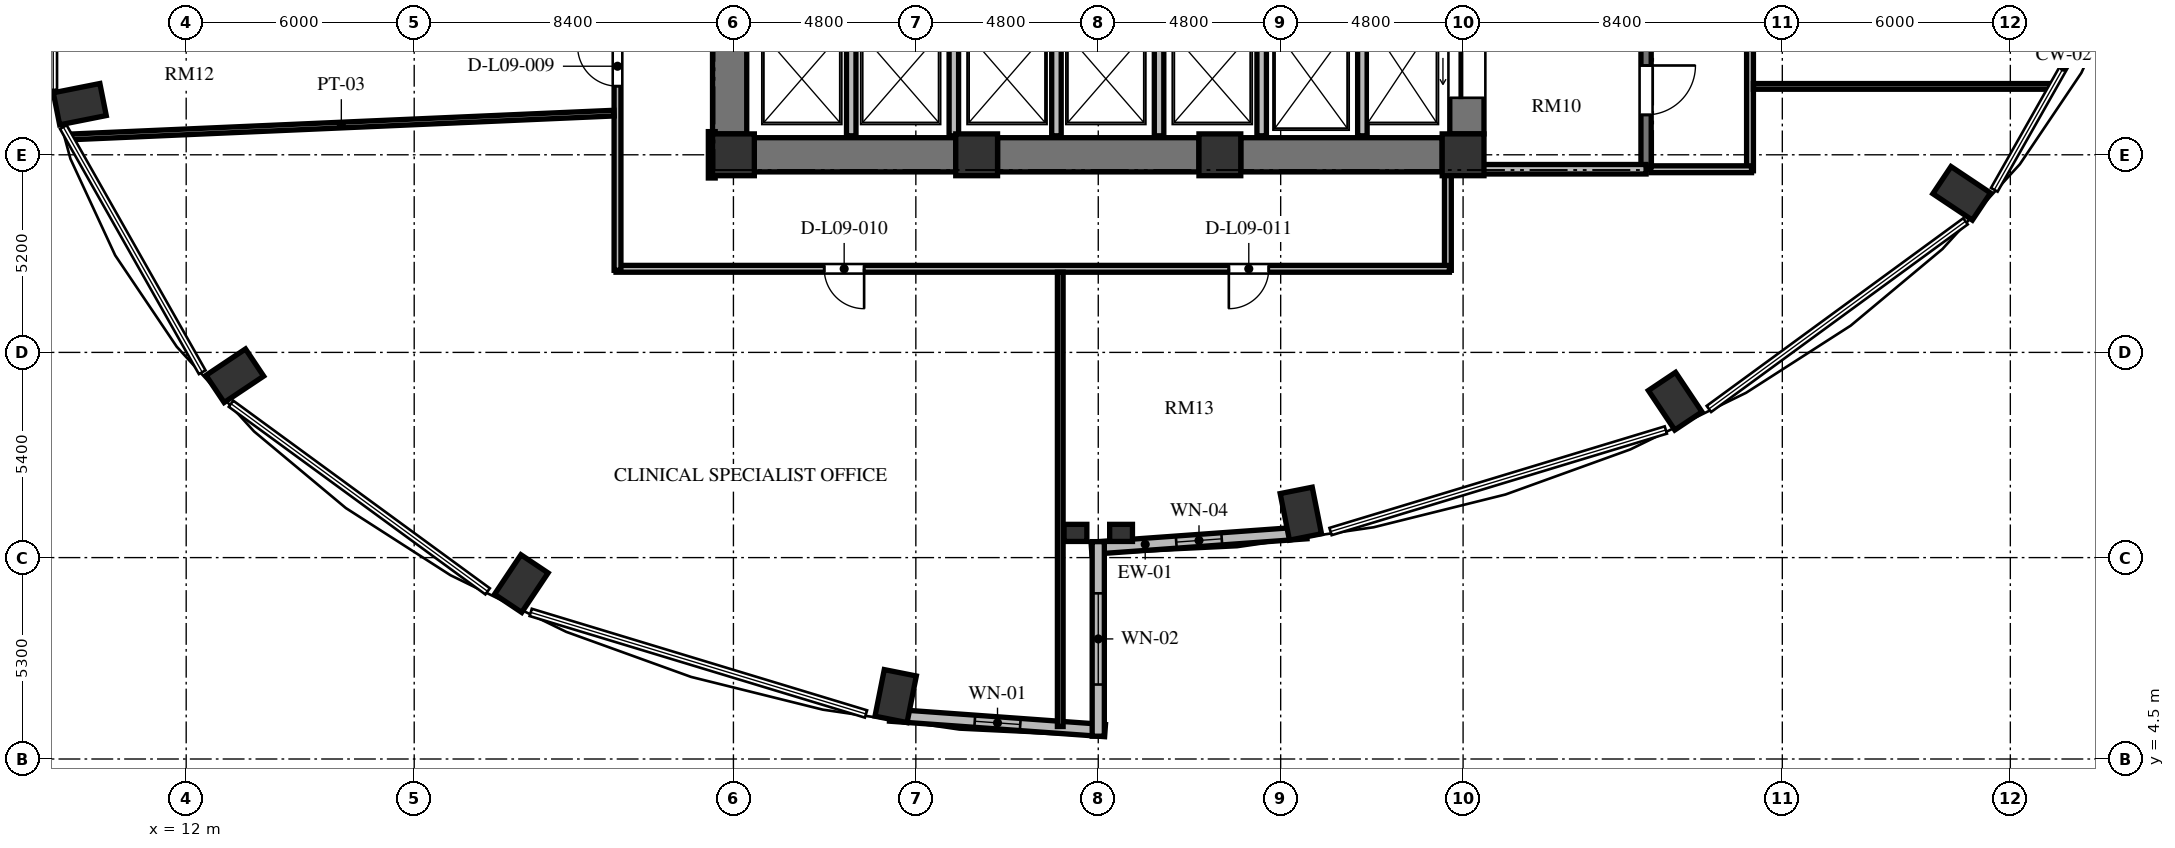
"""IFC4 building model, lengths in metres.
Left out: names, types, materials, properties, quantities, classifications, styles, units other than length and angle.
Written with IfcOpenShell. Run it as: python <this file> out.ifc"""

import sys

from ifc_helpers import new_model, si_unit, direction, frame, frame_2d, origin, origin_2d, place, context, subcontext, project, spatial, rectangle, extrude, element, fill, save


model = new_model("IFC4")
c1 = context("Model", 3, precision=1e-05, world=origin(), true_north=direction((0.0, 1.0)))
c2 = subcontext(c1, "Body", "Model", "MODEL_VIEW")
j1 = project(units=[si_unit("LENGTHUNIT", "METRE"), si_unit("PLANEANGLEUNIT", "RADIAN")], contexts=[c1])
p1 = place(None, origin())
s1 = spatial("IfcSite", under=j1, at=p1, CompositionType="ELEMENT")
p2 = place(p1, origin())
s2 = spatial("IfcBuilding", under=s1, at=p2, CompositionType="ELEMENT")
p3 = place(p2, frame((0.0, 0.0, 39.792)))
s3 = spatial("IfcBuildingStorey", under=s2, at=p3, CompositionType="ELEMENT", Elevation=39.792)
for number, where, z_axis, x_axis in (
    (1, (41.331, 10.956, 0.0), (0.0, 0.0, 1.0), (0.195, -0.981, 0.0)),
    (2, (51.181, 13.916, 0.0), (0.0, 0.0, 1.0), (0.556, -0.831, 0.0)),
    (3, (58.72, 19.386, 0.0), (0.0, 0.0, 1.0), (0.831, -0.556, 0.0)),
    (4, (9.2, 21.732, 0.0), (0.0, 0.0, 1.0), (-0.981, -0.195, 0.0)),
    (5, (13.28, 14.586, 0.0), (0.0, 0.0, 1.0), (-0.831, -0.556, 0.0)),
    (6, (20.819, 9.116, 0.0), (0.0, 0.0, 1.0), (-0.556, -0.831, 0.0)),
    (7, (30.669, 6.156, 0.0), (0.0, 0.0, 1.0), (-0.195, -0.981, 0.0)),
):
    element("IfcColumn", number, at=place(p3, frame(where, z_axis=z_axis, x_axis=x_axis)), inside=s3, PredefinedType="COLUMN", context=c2, shape_type="SweptSolid", body=[
        extrude(rectangle(XDim=1.25, YDim=0.86, at=origin_2d()), origin(), (0.0, 0.0, 1.0), 3.648),
    ])
for number, where, z_axis, x_axis in (
    (8, (26.4, 20.4, 0.0), (0.0, 0.0, 1.0), (1.0, 0.0, 0.0)),
    (9, (32.8, 20.4, 0.0), (0.0, 0.0, 1.0), (1.0, 0.0, 0.0)),
    (10, (39.2, 20.4, 0.0), (0.0, 0.0, 1.0), (1.0, 0.0, 0.0)),
    (11, (45.6, 20.4, 0.0), (0.0, 0.0, 1.0), (1.0, 0.0, 0.0)),
):
    element("IfcColumn", number, at=place(p3, frame(where, z_axis=z_axis, x_axis=x_axis)), inside=s3, PredefinedType="COLUMN", context=c2, shape_type="SweptSolid", body=[
        extrude(rectangle(XDim=1.1, YDim=1.1, at=origin_2d()), origin(), (0.0, 0.0, 1.0), 3.648),
    ])
for number, where, z_axis, x_axis in (
    (12, (35.4, 10.45, 0.0), (0.0, 0.0, 1.0), (1.0, 0.0, 0.0)),
    (13, (36.6, 10.45, 0.0), (0.0, 0.0, 1.0), (1.0, 0.0, 0.0)),
):
    element("IfcColumn", number, at=place(p3, frame(where, z_axis=z_axis, x_axis=x_axis)), inside=s3, PredefinedType="PILASTER", context=c2, shape_type="SweptSolid", body=[
        extrude(rectangle(XDim=0.6, YDim=0.45, at=origin_2d()), origin(), (0.0, 0.0, 1.0), 3.648),
    ])
p4 = place(p3, frame((26.3, 20.95, 0.0), z_axis=(0.0, 0.0, 1.0), x_axis=(0.0, 1.0, 0.0)))
e14 = element("IfcWall", 14, at=p4, inside=s3, PredefinedType="SHEAR", context=c2, shape_type="SweptSolid", body=[
    extrude(rectangle(XDim=14.1, YDim=0.9, at=frame_2d((7.05, 0.0))), origin(), (0.0, 0.0, 1.0), 3.648),
])
p5 = place(p4, frame((6.5, 0.0, 0.0)))
e15 = element("IfcOpeningElement", 15, at=p5, cuts=e14, PredefinedType="OPENING", context=c2, shape_type="SweptSolid", body=[
    extrude(rectangle(XDim=1.2, YDim=2.15, at=frame_2d((0.6, 1.075))), frame((0.0, 0.46, 0.0), z_axis=(0.0, -1.0, 0.0), x_axis=(1.0, 0.0, 0.0)), (0.0, 0.0, 1.0), 0.92),
])
p6 = place(p4, frame((9.6, 0.0, 0.0)))
e16 = element("IfcOpeningElement", 16, at=p6, cuts=e14, PredefinedType="OPENING", context=c2, shape_type="SweptSolid", body=[
    extrude(rectangle(XDim=1.3, YDim=2.2, at=frame_2d((0.65, 1.1))), frame((0.0, 0.46, 0.0), z_axis=(0.0, -1.0, 0.0), x_axis=(1.0, 0.0, 0.0)), (0.0, 0.0, 1.0), 0.92),
])
p7 = place(p4, frame((3.26, 0.0, 0.0)))
e17 = element("IfcOpeningElement", 17, at=p7, cuts=e14, PredefinedType="OPENING", context=c2, shape_type="SweptSolid", body=[
    extrude(rectangle(XDim=1.3, YDim=2.2, at=frame_2d((0.65, 1.1))), frame((0.0, 0.46, 0.0), z_axis=(0.0, -1.0, 0.0), x_axis=(1.0, 0.0, 0.0)), (0.0, 0.0, 1.0), 0.92),
])
p8 = place(p3, frame((45.7, 20.95, 0.0), z_axis=(0.0, 0.0, 1.0), x_axis=(0.0, 1.0, 0.0)))
e18 = element("IfcWall", 18, at=p8, inside=s3, PredefinedType="SHEAR", context=c2, shape_type="SweptSolid", body=[
    extrude(rectangle(XDim=14.1, YDim=0.9, at=frame_2d((7.05, 0.0))), origin(), (0.0, 0.0, 1.0), 3.648),
])
p9 = place(p8, frame((11.75, 0.0, 0.0)))
e19 = element("IfcOpeningElement", 19, at=p9, cuts=e18, PredefinedType="OPENING", context=c2, shape_type="SweptSolid", body=[
    extrude(rectangle(XDim=1.4, YDim=2.3, at=frame_2d((0.7, 1.15))), frame((0.0, 0.46, 0.0), z_axis=(0.0, -1.0, 0.0), x_axis=(1.0, 0.0, 0.0)), (0.0, 0.0, 1.0), 0.92),
])
p10 = place(p8, frame((0.95, 0.0, 0.0)))
e20 = element("IfcOpeningElement", 20, at=p10, cuts=e18, PredefinedType="OPENING", context=c2, shape_type="SweptSolid", body=[
    extrude(rectangle(XDim=1.4, YDim=2.3, at=frame_2d((0.7, 1.15))), frame((0.0, 0.46, 0.0), z_axis=(0.0, -1.0, 0.0), x_axis=(1.0, 0.0, 0.0)), (0.0, 0.0, 1.0), 0.92),
])
p11 = place(p3, frame((26.95, 20.4, 0.0), z_axis=(0.0, 0.0, 1.0), x_axis=(1.0, 0.0, 0.0)))
e21 = element("IfcWall", 21, at=p11, inside=s3, PredefinedType="SHEAR", context=c2, shape_type="SweptSolid", body=[
    extrude(rectangle(XDim=5.3, YDim=0.9, at=frame_2d((2.65, 0.0))), origin(), (0.0, 0.0, 1.0), 3.648),
])
p12 = place(p3, frame((33.35, 20.4, 0.0), z_axis=(0.0, 0.0, 1.0), x_axis=(1.0, 0.0, 0.0)))
e22 = element("IfcWall", 22, at=p12, inside=s3, PredefinedType="SHEAR", context=c2, shape_type="SweptSolid", body=[
    extrude(rectangle(XDim=5.3, YDim=0.9, at=frame_2d((2.65, 0.0))), origin(), (0.0, 0.0, 1.0), 3.648),
])
p13 = place(p3, frame((39.75, 20.4, 0.0), z_axis=(0.0, 0.0, 1.0), x_axis=(1.0, 0.0, 0.0)))
e23 = element("IfcWall", 23, at=p13, inside=s3, PredefinedType="SHEAR", context=c2, shape_type="SweptSolid", body=[
    extrude(rectangle(XDim=5.3, YDim=0.9, at=frame_2d((2.65, 0.0))), origin(), (0.0, 0.0, 1.0), 3.648),
])
p14 = place(p3, frame((35.821, 10.047, 0.0), z_axis=(0.0, 0.0, 1.0), x_axis=(0.997422321809, 0.071754525696, 0.0)))
e24 = element("IfcWall", 24, at=p14, inside=s3, PredefinedType="SOLIDWALL", context=c2, shape_type="SweptSolid", body=[
    extrude(rectangle(XDim=5.675, YDim=0.32, at=frame_2d((2.838, 0.0))), origin(), (0.0, 0.0, 1.0), 3.428),
])
p15 = place(p14, frame((2.238, 0.0, 0.85)))
e25 = element("IfcOpeningElement", 25, at=p15, cuts=e24, PredefinedType="OPENING", context=c2, shape_type="SweptSolid", body=[
    extrude(rectangle(XDim=1.2, YDim=1.8, at=frame_2d((0.6, 0.9))), frame((0.0, 0.17, 0.0), z_axis=(0.0, -1.0, 0.0), x_axis=(1.0, 0.0, 0.0)), (0.0, 0.0, 1.0), 0.34),
])
p16 = place(p3, frame((30.519, 5.654, 0.0), z_axis=(0.0, 0.0, 1.0), x_axis=(0.997421878774, -0.071760683825, 0.0)))
e26 = element("IfcWall", 26, at=p16, inside=s3, PredefinedType="SOLIDWALL", context=c2, shape_type="SweptSolid", body=[
    extrude(rectangle(XDim=5.675, YDim=0.32, at=frame_2d((2.837, 0.0))), origin(), (0.0, 0.0, 1.0), 3.428),
])
p17 = place(p16, frame((2.237, 0.0, 0.85)))
e27 = element("IfcOpeningElement", 27, at=p17, cuts=e26, PredefinedType="OPENING", context=c2, shape_type="SweptSolid", body=[
    extrude(rectangle(XDim=1.2, YDim=2.2, at=frame_2d((0.6, 1.1))), frame((0.0, 0.17, 0.0), z_axis=(0.0, -1.0, 0.0), x_axis=(1.0, 0.0, 0.0)), (0.0, 0.0, 1.0), 0.34),
])
p18 = place(p3, frame((36.0, 5.1, 0.0), z_axis=(0.0, 0.0, 1.0), x_axis=(0.0, 1.0, 0.0)))
e28 = element("IfcWall", 28, at=p18, inside=s3, PredefinedType="SOLIDWALL", context=c2, shape_type="SweptSolid", body=[
    extrude(rectangle(XDim=5.12, YDim=0.32, at=frame_2d((2.56, 0.0))), origin(), (0.0, 0.0, 1.0), 3.428),
])
p19 = place(p18, frame((1.36, 0.0, 0.84)))
e29 = element("IfcOpeningElement", 29, at=p19, cuts=e28, PredefinedType="OPENING", context=c2, shape_type="SweptSolid", body=[
    extrude(rectangle(XDim=2.4, YDim=2.04, at=frame_2d((1.2, 1.02))), frame((0.0, 0.17, 0.0), z_axis=(0.0, -1.0, 0.0), x_axis=(1.0, 0.0, 0.0)), (0.0, 0.0, 1.0), 0.34),
])
p20 = place(p3, frame((42.95, 20.9, 0.0), z_axis=(0.0, 0.0, 1.0), x_axis=(0.0, 1.0, 0.0)))
e30 = element("IfcWall", 30, at=p20, inside=s3, PredefinedType="SOLIDWALL", context=c2, shape_type="SweptSolid", body=[
    extrude(rectangle(XDim=3.2, YDim=0.25, at=frame_2d((1.6, 0.0))), origin(), (0.0, 0.0, 1.0), 3.428),
])
for number, where, z_axis, x_axis in (
    (31, (29.5, 20.9, 0.0), (0.0, 0.0, 1.0), (0.0, 1.0, 0.0)),
    (32, (32.2, 20.9, 0.0), (0.0, 0.0, 1.0), (0.0, 1.0, 0.0)),
    (33, (34.9, 20.9, 0.0), (0.0, 0.0, 1.0), (0.0, 1.0, 0.0)),
    (34, (37.6, 20.9, 0.0), (0.0, 0.0, 1.0), (0.0, 1.0, 0.0)),
    (35, (40.3, 20.9, 0.0), (0.0, 0.0, 1.0), (0.0, 1.0, 0.0)),
):
    element("IfcWall", number, at=place(p3, frame(where, z_axis=z_axis, x_axis=x_axis)), inside=s3, PredefinedType="SOLIDWALL", context=c2, shape_type="SweptSolid", body=[
        extrude(rectangle(XDim=2.8, YDim=0.25, at=frame_2d((1.4, 0.0))), origin(), (0.0, 0.0, 1.0), 3.428),
    ])
p21 = place(p3, frame((50.415, 35.845, 0.0), z_axis=(0.0, 0.0, 1.0), x_axis=(0.0, -1.0, 0.0)))
e36 = element("IfcWall", 36, at=p21, inside=s3, PredefinedType="SHEAR", context=c2, shape_type="SweptSolid", body=[
    extrude(rectangle(XDim=15.825, YDim=0.27, at=frame_2d((7.913, 0.0))), origin(), (0.0, 0.0, 1.0), 3.648),
])
p22 = place(p21, frame((4.445, 0.0, 0.0)))
e37 = element("IfcOpeningElement", 37, at=p22, cuts=e36, PredefinedType="OPENING", context=c2, shape_type="SweptSolid", body=[
    extrude(rectangle(XDim=1.2, YDim=2.15, at=frame_2d((0.6, 1.075))), frame((0.0, 0.145, 0.0), z_axis=(0.0, -1.0, 0.0), x_axis=(1.0, 0.0, 0.0)), (0.0, 0.0, 1.0), 0.29),
])
p23 = place(p21, frame((1.295, 0.0, 0.0)))
e38 = element("IfcOpeningElement", 38, at=p23, cuts=e36, PredefinedType="OPENING", context=c2, shape_type="SweptSolid", body=[
    extrude(rectangle(XDim=1.3, YDim=2.2, at=frame_2d((0.65, 1.1))), frame((0.0, 0.145, 0.0), z_axis=(0.0, -1.0, 0.0), x_axis=(1.0, 0.0, 0.0)), (0.0, 0.0, 1.0), 0.29),
])
p24 = place(p21, frame((13.095, 0.0, 0.0)))
e39 = element("IfcOpeningElement", 39, at=p24, cuts=e36, PredefinedType="OPENING", context=c2, shape_type="SweptSolid", body=[
    extrude(rectangle(XDim=1.3, YDim=2.2, at=frame_2d((0.65, 1.1))), frame((0.0, 0.145, 0.0), z_axis=(0.0, -1.0, 0.0), x_axis=(1.0, 0.0, 0.0)), (0.0, 0.0, 1.0), 0.29),
])
p25 = place(p3, frame((45.7, 20.02, 0.0), z_axis=(0.0, 0.0, 1.0), x_axis=(1.0, 0.0, 0.0)))
e40 = element("IfcWall", 40, at=p25, inside=s3, PredefinedType="SOLIDWALL", context=c2, shape_type="SweptSolid", body=[
    extrude(rectangle(XDim=4.715, YDim=0.25, at=frame_2d((2.357, 0.0))), origin(), (0.0, 0.0, 1.0), 2.813),
])
p26 = place(p3, frame((53.15, 26.64, 0.0), z_axis=(0.0, 0.0, 1.0), x_axis=(0.0, -1.0, 0.0)))
e41 = element("IfcWall", 41, at=p26, inside=s3, PredefinedType="PARTITIONING", context=c2, shape_type="SweptSolid", body=[
    extrude(rectangle(XDim=6.66, YDim=0.18, at=frame_2d((3.33, 0.0))), origin(), (0.0, 0.0, 1.0), 3.428),
])
p27 = place(p3, frame((53.19, 20.02, 0.0), z_axis=(0.0, 0.0, 1.0), x_axis=(-1.0, 0.0, 0.0)))
e42 = element("IfcWall", 42, at=p27, inside=s3, PredefinedType="PARTITIONING", context=c2, shape_type="SweptSolid", body=[
    extrude(rectangle(XDim=2.65, YDim=0.18, at=frame_2d((1.325, 0.0))), origin(), (0.0, 0.0, 1.0), 2.813),
])
p28 = place(p3, frame((25.83, 21.01, 0.0), z_axis=(0.0, 0.0, 1.0), x_axis=(0.0, -1.0, 0.0)))
e43 = element("IfcWall", 43, at=p28, inside=s3, PredefinedType="PARTITIONING", context=c2, shape_type="SweptSolid", body=[
    extrude(rectangle(XDim=1.22, YDim=0.18, at=frame_2d((0.61, 0.0))), origin(), (0.0, 0.0, 1.0), 3.428),
])
p29 = place(p3, frame((45.2, 19.91, 0.0), z_axis=(0.0, 0.0, 1.0), x_axis=(0.0, -1.0, 0.0)))
e44 = element("IfcWall", 44, at=p29, inside=s3, PredefinedType="PARTITIONING", context=c2, shape_type="SweptSolid", body=[
    extrude(rectangle(XDim=2.55, YDim=0.18, at=frame_2d((1.275, 0.0))), origin(), (0.0, 0.0, 1.0), 3.428),
])
p30 = place(p3, frame((45.24, 17.4, 0.0), z_axis=(0.0, 0.0, 1.0), x_axis=(-1.0, 0.0, 0.0)))
e45 = element("IfcWall", 45, at=p30, inside=s3, PredefinedType="PARTITIONING", context=c2, shape_type="SweptSolid", body=[
    extrude(rectangle(XDim=21.93, YDim=0.18, at=frame_2d((10.965, 0.0))), origin(), (0.0, 0.0, 1.0), 3.053),
])
p31 = place(p30, frame((15.401, 0.0, 0.0)))
e46 = element("IfcOpeningElement", 46, at=p31, cuts=e45, PredefinedType="OPENING", context=c2, shape_type="SweptSolid", body=[
    extrude(rectangle(XDim=1.05, YDim=2.15, at=frame_2d((0.525, 1.075))), frame((0.0, 0.1, 0.0), z_axis=(0.0, -1.0, 0.0), x_axis=(1.0, 0.0, 0.0)), (0.0, 0.0, 1.0), 0.2),
])
p32 = place(p30, frame((4.754, 0.0, 0.0)))
e47 = element("IfcOpeningElement", 47, at=p32, cuts=e45, PredefinedType="OPENING", context=c2, shape_type="SweptSolid", body=[
    extrude(rectangle(XDim=1.05, YDim=2.15, at=frame_2d((0.525, 1.075))), frame((0.0, 0.1, 0.0), z_axis=(0.0, -1.0, 0.0), x_axis=(1.0, 0.0, 0.0)), (0.0, 0.0, 1.0), 0.2),
])
p33 = place(p3, frame((23.35, 17.36, 0.0), z_axis=(0.0, 0.0, 1.0), x_axis=(0.0, 1.0, 0.0)))
e48 = element("IfcWall", 48, at=p33, inside=s3, PredefinedType="PARTITIONING", context=c2, shape_type="SweptSolid", body=[
    extrude(rectangle(XDim=9.28, YDim=0.18, at=frame_2d((4.64, 0.0))), origin(), (0.0, 0.0, 1.0), 3.428),
])
p34 = place(p33, frame((4.846, 0.0, 0.0)))
e49 = element("IfcOpeningElement", 49, at=p34, cuts=e48, PredefinedType="OPENING", context=c2, shape_type="SweptSolid", body=[
    extrude(rectangle(XDim=1.05, YDim=2.15, at=frame_2d((0.525, 1.075))), frame((0.0, 0.1, 0.0), z_axis=(0.0, -1.0, 0.0), x_axis=(1.0, 0.0, 0.0)), (0.0, 0.0, 1.0), 0.2),
])
p35 = place(p3, frame((8.905, 20.868, 0.0), z_axis=(0.0, 0.0, 1.0), x_axis=(0.999043936959, 0.043717411007, 0.0)))
e50 = element("IfcWall", 50, at=p35, inside=s3, PredefinedType="PARTITIONING", context=c2, shape_type="SweptSolid", body=[
    extrude(rectangle(XDim=14.369, YDim=0.15, at=frame_2d((7.185, 0.0))), origin(), (0.0, 0.0, 1.0), 2.813),
])
p36 = place(p3, frame((53.24, 22.2, 0.0), z_axis=(0.0, 0.0, 1.0), x_axis=(1.0, 0.0, 0.0)))
e51 = element("IfcWall", 51, at=p36, inside=s3, PredefinedType="PARTITIONING", context=c2, shape_type="SweptSolid", body=[
    extrude(rectangle(XDim=7.875, YDim=0.15, at=frame_2d((3.938, 0.0))), origin(), (0.0, 0.0, 1.0), 3.428),
])
p37 = place(p3, frame((35.0, 5.356, 0.0), z_axis=(0.0, 0.0, 1.0), x_axis=(0.0, 1.0, 0.0)))
e52 = element("IfcWall", 52, at=p37, inside=s3, PredefinedType="PARTITIONING", context=c2, shape_type="SweptSolid", body=[
    extrude(rectangle(XDim=11.954, YDim=0.15, at=frame_2d((5.977, 0.0))), origin(), (0.0, 0.0, 1.0), 3.428),
])
p38 = place(p15, origin())
e53 = element("IfcWindow", 53, at=p38, inside=s3, PartitioningType="SINGLE_PANEL", PredefinedType="WINDOW", context=c2, shape_type="SweptSolid", body=[
    extrude(rectangle(XDim=1.2, YDim=1.8, at=frame_2d((0.6, 0.9))), frame((0.0, 0.03, 0.0), z_axis=(0.0, -1.0, 0.0), x_axis=(1.0, 0.0, 0.0)), (0.0, 0.0, 1.0), 0.06),
])
fill(e25, e53)
p39 = place(p17, origin())
e54 = element("IfcWindow", 54, at=p39, inside=s3, PartitioningType="SINGLE_PANEL", PredefinedType="WINDOW", context=c2, shape_type="SweptSolid", body=[
    extrude(rectangle(XDim=1.2, YDim=2.2, at=frame_2d((0.6, 1.1))), frame((0.0, 0.03, 0.0), z_axis=(0.0, -1.0, 0.0), x_axis=(1.0, 0.0, 0.0)), (0.0, 0.0, 1.0), 0.06),
])
fill(e27, e54)
p40 = place(p19, origin())
e55 = element("IfcWindow", 55, at=p40, inside=s3, PartitioningType="SINGLE_PANEL", PredefinedType="WINDOW", context=c2, shape_type="SweptSolid", body=[
    extrude(rectangle(XDim=2.4, YDim=2.04, at=frame_2d((1.2, 1.02))), frame((0.0, 0.03, 0.0), z_axis=(0.0, -1.0, 0.0), x_axis=(1.0, 0.0, 0.0)), (0.0, 0.0, 1.0), 0.06),
])
fill(e29, e55)
p41 = place(p10, origin())
e56 = element("IfcDoor", 56, at=p41, inside=s3, OperationType="SLIDING_TO_LEFT", PredefinedType="DOOR", context=c2, shape_type="SweptSolid", body=[
    extrude(rectangle(XDim=1.4, YDim=2.3, at=frame_2d((0.7, 1.15))), frame((0.0, 0.025, 0.0), z_axis=(0.0, -1.0, 0.0), x_axis=(1.0, 0.0, 0.0)), (0.0, 0.0, 1.0), 0.05),
])
fill(e20, e56)
p42 = place(p24, origin())
e57 = element("IfcDoor", 57, at=p42, inside=s3, OperationType="SINGLE_SWING_LEFT", PredefinedType="DOOR", context=c2, shape_type="SweptSolid", body=[
    extrude(rectangle(XDim=1.3, YDim=2.2, at=frame_2d((0.65, 1.1))), frame((0.0, 0.025, 0.0), z_axis=(0.0, -1.0, 0.0), x_axis=(1.0, 0.0, 0.0)), (0.0, 0.0, 1.0), 0.05),
])
fill(e39, e57)
p43 = place(p34, origin())
e58 = element("IfcDoor", 58, at=p43, inside=s3, OperationType="SINGLE_SWING_RIGHT", PredefinedType="DOOR", context=c2, shape_type="SweptSolid", body=[
    extrude(rectangle(XDim=1.05, YDim=2.15, at=frame_2d((0.525, 1.075))), frame((0.0, 0.025, 0.0), z_axis=(0.0, -1.0, 0.0), x_axis=(1.0, 0.0, 0.0)), (0.0, 0.0, 1.0), 0.05),
])
fill(e49, e58)
p44 = place(p31, origin())
e59 = element("IfcDoor", 59, at=p44, inside=s3, OperationType="SINGLE_SWING_LEFT", PredefinedType="DOOR", context=c2, shape_type="SweptSolid", body=[
    extrude(rectangle(XDim=1.05, YDim=2.15, at=frame_2d((0.525, 1.075))), frame((0.0, 0.025, 0.0), z_axis=(0.0, -1.0, 0.0), x_axis=(1.0, 0.0, 0.0)), (0.0, 0.0, 1.0), 0.05),
])
fill(e46, e59)
p45 = place(p32, origin())
e60 = element("IfcDoor", 60, at=p45, inside=s3, OperationType="SINGLE_SWING_RIGHT", PredefinedType="DOOR", context=c2, shape_type="SweptSolid", body=[
    extrude(rectangle(XDim=1.05, YDim=2.15, at=frame_2d((0.525, 1.075))), frame((0.0, 0.025, 0.0), z_axis=(0.0, -1.0, 0.0), x_axis=(1.0, 0.0, 0.0)), (0.0, 0.0, 1.0), 0.05),
])
fill(e47, e60)
save(model, sys.argv[1])
